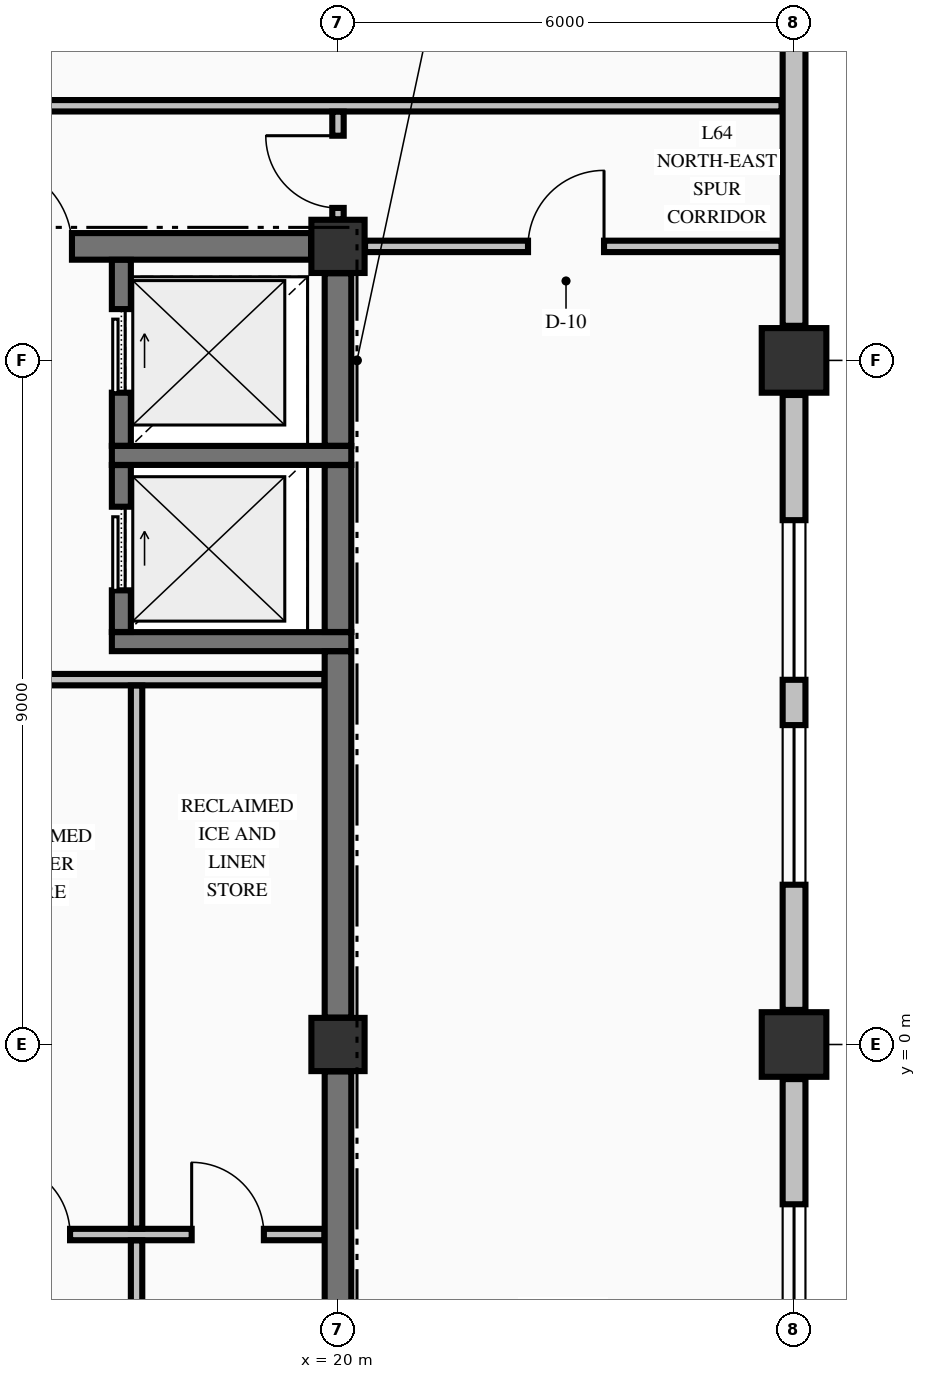
"""IFC4 building model, lengths in metres.
Left out: names, types, materials, properties, quantities, classifications, styles, units other than length and angle.
Written with IfcOpenShell. Run it as: python <this file> out.ifc"""

import sys

from ifc_helpers import new_model, si_unit, direction, frame, frame_2d, origin, origin_2d, place, context, subcontext, project, spatial, rectangle, extrude, element, fill, save


model = new_model("IFC4")
c1 = context("Model", 3, precision=1e-05, world=origin(), true_north=direction((0.0, 1.0)))
c2 = subcontext(c1, "Body", "Model", "MODEL_VIEW")
j1 = project(units=[si_unit("LENGTHUNIT", "METRE"), si_unit("PLANEANGLEUNIT", "RADIAN")], contexts=[c1])
p1 = place(None, origin())
s1 = spatial("IfcSite", under=j1, at=p1, CompositionType="ELEMENT")
p2 = place(p1, origin())
s2 = spatial("IfcBuilding", under=s1, at=p2, CompositionType="ELEMENT")
p3 = place(p2, frame((0.0, 0.0, 242.97)))
s3 = spatial("IfcBuildingStorey", under=s2, at=p3, CompositionType="ELEMENT", Elevation=242.97)
for number, where, z_axis, x_axis in (
    (1, (26.0, 0.0, -0.25), (0.0, 0.0, 1.0), (1.0, 0.0, 0.0)),
    (2, (26.0, 9.0, -0.25), (0.0, 0.0, 1.0), (1.0, 0.0, 0.0)),
):
    element("IfcColumn", number, at=place(p3, frame(where, z_axis=z_axis, x_axis=x_axis)), inside=s3, PredefinedType="COLUMN", context=c2, shape_type="SweptSolid", body=[
        extrude(rectangle(XDim=0.85, YDim=0.85, at=origin_2d()), origin(), (0.0, 0.0, 1.0), 3.23),
    ])
for number, where, z_axis, x_axis in (
    (3, (20.0, 10.5, -0.25), (0.0, 0.0, 1.0), (1.0, 0.0, 0.0)),
    (4, (20.0, 0.0, -0.25), (0.0, 0.0, 1.0), (1.0, 0.0, 0.0)),
):
    element("IfcColumn", number, at=place(p3, frame(where, z_axis=z_axis, x_axis=x_axis)), inside=s3, PredefinedType="COLUMN", context=c2, shape_type="SweptSolid", body=[
        extrude(rectangle(XDim=0.7, YDim=0.7, at=origin_2d()), origin(), (0.0, 0.0, 1.0), 3.23),
    ])
p4 = place(p3, frame((26.0, -8.545, 0.0), z_axis=(0.0, 0.0, 1.0), x_axis=(0.0, 1.0, 0.0)))
e5 = element("IfcWall", 5, at=p4, inside=s3, PredefinedType="STANDARD", context=c2, shape_type="SweptSolid", body=[
    extrude(rectangle(XDim=8.09, YDim=0.3, at=frame_2d((4.045, 0.0))), origin(), (0.0, 0.0, 1.0), 2.372),
])
p5 = place(p4, frame((1.647, 0.0, 0.7)))
e6 = element("IfcOpeningElement", 6, at=p5, cuts=e5, PredefinedType="OPENING", context=c2, shape_type="SweptSolid", body=[
    extrude(rectangle(XDim=2.1, YDim=1.5, at=frame_2d((1.05, 0.75))), frame((0.0, 0.16, 0.0), z_axis=(0.0, -1.0, 0.0), x_axis=(1.0, 0.0, 0.0)), (0.0, 0.0, 1.0), 0.32),
])
p6 = place(p4, frame((4.343, 0.0, 0.7)))
e7 = element("IfcOpeningElement", 7, at=p6, cuts=e5, PredefinedType="OPENING", context=c2, shape_type="SweptSolid", body=[
    extrude(rectangle(XDim=2.1, YDim=1.5, at=frame_2d((1.05, 0.75))), frame((0.0, 0.16, 0.0), z_axis=(0.0, -1.0, 0.0), x_axis=(1.0, 0.0, 0.0)), (0.0, 0.0, 1.0), 0.32),
])
p7 = place(p3, frame((26.0, 0.455, 0.0), z_axis=(0.0, 0.0, 1.0), x_axis=(0.0, 1.0, 0.0)))
e8 = element("IfcWall", 8, at=p7, inside=s3, PredefinedType="STANDARD", context=c2, shape_type="SweptSolid", body=[
    extrude(rectangle(XDim=8.09, YDim=0.3, at=frame_2d((4.045, 0.0))), origin(), (0.0, 0.0, 1.0), 2.372),
])
p8 = place(p7, frame((1.647, 0.0, 0.7)))
e9 = element("IfcOpeningElement", 9, at=p8, cuts=e8, PredefinedType="OPENING", context=c2, shape_type="SweptSolid", body=[
    extrude(rectangle(XDim=2.1, YDim=1.5, at=frame_2d((1.05, 0.75))), frame((0.0, 0.16, 0.0), z_axis=(0.0, -1.0, 0.0), x_axis=(1.0, 0.0, 0.0)), (0.0, 0.0, 1.0), 0.32),
])
p9 = place(p7, frame((4.343, 0.0, 0.7)))
e10 = element("IfcOpeningElement", 10, at=p9, cuts=e8, PredefinedType="OPENING", context=c2, shape_type="SweptSolid", body=[
    extrude(rectangle(XDim=2.1, YDim=1.5, at=frame_2d((1.05, 0.75))), frame((0.0, 0.16, 0.0), z_axis=(0.0, -1.0, 0.0), x_axis=(1.0, 0.0, 0.0)), (0.0, 0.0, 1.0), 0.32),
])
p10 = place(p3, frame((26.0, 9.455, 0.0), z_axis=(0.0, 0.0, 1.0), x_axis=(0.0, 1.0, 0.0)))
e11 = element("IfcWall", 11, at=p10, inside=s3, PredefinedType="STANDARD", context=c2, shape_type="SweptSolid", body=[
    extrude(rectangle(XDim=8.09, YDim=0.3, at=frame_2d((4.045, 0.0))), origin(), (0.0, 0.0, 1.0), 2.372),
])
for number, where, z_axis, x_axis in (
    (12, (17.025, 5.3, 0.0), (0.0, 0.0, 1.0), (1.0, 0.0, 0.0)),
    (13, (17.025, 7.75, 0.0), (0.0, 0.0, 1.0), (1.0, 0.0, 0.0)),
):
    element("IfcWall", number, at=place(p3, frame(where, z_axis=z_axis, x_axis=x_axis)), inside=s3, PredefinedType="SOLIDWALL", context=c2, shape_type="SweptSolid", body=[
        extrude(rectangle(XDim=3.15, YDim=0.25, at=frame_2d((1.575, 0.0))), origin(), (0.0, 0.0, 1.0), 2.98),
    ])
p11 = place(p3, frame((14.7, 10.5, 0.0), z_axis=(0.0, 0.0, 1.0), x_axis=(1.0, 0.0, 0.0)))
e14 = element("IfcWall", 14, at=p11, inside=s3, PredefinedType="SHEAR", context=c2, shape_type="SweptSolid", body=[
    extrude(rectangle(XDim=4.946, YDim=0.35, at=frame_2d((2.473, 0.0))), origin(), (0.0, 0.0, 1.0), 2.98),
])
p12 = place(p11, frame((0.7, 0.0, 0.0)))
e15 = element("IfcOpeningElement", 15, at=p12, cuts=e14, PredefinedType="OPENING", context=c2, shape_type="SweptSolid", body=[
    extrude(rectangle(XDim=1.1, YDim=2.15, at=frame_2d((0.55, 1.075))), frame((0.0, 0.185, 0.0), z_axis=(0.0, -1.0, 0.0), x_axis=(1.0, 0.0, 0.0)), (0.0, 0.0, 1.0), 0.37),
])
p13 = place(p3, frame((14.878, -2.5, 0.0), z_axis=(0.0, 0.0, 1.0), x_axis=(1.0, 0.0, 0.0)))
e16 = element("IfcWall", 16, at=p13, inside=s3, PredefinedType="PARTITIONING", context=c2, shape_type="SweptSolid", body=[
    extrude(rectangle(XDim=4.944, YDim=0.15, at=frame_2d((2.472, 0.0))), origin(), (0.0, 0.0, 1.0), 2.98),
])
p14 = place(p13, frame((0.647, 0.0, 0.0)))
e17 = element("IfcOpeningElement", 17, at=p14, cuts=e16, PredefinedType="OPENING", context=c2, shape_type="SweptSolid", body=[
    extrude(rectangle(XDim=0.95, YDim=2.15, at=frame_2d((0.475, 1.075))), frame((0.0, 0.085, 0.0), z_axis=(0.0, -1.0, 0.0), x_axis=(1.0, 0.0, 0.0)), (0.0, 0.0, 1.0), 0.17),
])
p15 = place(p13, frame((3.197, 0.0, 0.0)))
e18 = element("IfcOpeningElement", 18, at=p15, cuts=e16, PredefinedType="OPENING", context=c2, shape_type="SweptSolid", body=[
    extrude(rectangle(XDim=0.95, YDim=2.15, at=frame_2d((0.475, 1.075))), frame((0.0, 0.085, 0.0), z_axis=(0.0, -1.0, 0.0), x_axis=(1.0, 0.0, 0.0)), (0.0, 0.0, 1.0), 0.17),
])
p16 = place(p3, frame((14.878, 4.8, 0.0), z_axis=(0.0, 0.0, 1.0), x_axis=(1.0, 0.0, 0.0)))
e19 = element("IfcWall", 19, at=p16, inside=s3, PredefinedType="PARTITIONING", context=c2, shape_type="SweptSolid", body=[
    extrude(rectangle(XDim=4.944, YDim=0.15, at=frame_2d((2.472, 0.0))), origin(), (0.0, 0.0, 1.0), 2.98),
])
p17 = place(p3, frame((20.356, 10.5, 0.0), z_axis=(0.0, 0.0, 1.0), x_axis=(1.0, 0.0, 0.0)))
e20 = element("IfcWall", 20, at=p17, inside=s3, PredefinedType="PARTITIONING", context=c2, shape_type="SweptSolid", body=[
    extrude(rectangle(XDim=5.479, YDim=0.15, at=frame_2d((2.74, 0.0))), origin(), (0.0, 0.0, 1.0), 2.98),
])
p18 = place(p17, frame((2.144, 0.0, 0.0)))
e21 = element("IfcOpeningElement", 21, at=p18, cuts=e20, PredefinedType="OPENING", context=c2, shape_type="SweptSolid", body=[
    extrude(rectangle(XDim=1.0, YDim=2.15, at=frame_2d((0.5, 1.075))), frame((0.0, 0.085, 0.0), z_axis=(0.0, -1.0, 0.0), x_axis=(1.0, 0.0, 0.0)), (0.0, 0.0, 1.0), 0.17),
])
p19 = place(p3, frame((-20.075, 12.35, 0.0), z_axis=(0.0, 0.0, 1.0), x_axis=(1.0, 0.0, 0.0)))
e22 = element("IfcWall", 22, at=p19, inside=s3, PredefinedType="PARTITIONING", context=c2, shape_type="SweptSolid", body=[
    extrude(rectangle(XDim=45.91, YDim=0.15, at=frame_2d((22.955, 0.0))), origin(), (0.0, 0.0, 1.0), 2.98),
])
p20 = place(p19, frame((5.7, 0.0, 0.0)))
e23 = element("IfcOpeningElement", 23, at=p20, cuts=e22, PredefinedType="OPENING", context=c2, shape_type="SweptSolid", body=[
    extrude(rectangle(XDim=1.05, YDim=2.15, at=frame_2d((0.525, 1.075))), frame((0.0, 0.085, 0.0), z_axis=(0.0, -1.0, 0.0), x_axis=(1.0, 0.0, 0.0)), (0.0, 0.0, 1.0), 0.17),
])
p21 = place(p19, frame((17.3, 0.0, 0.0)))
e24 = element("IfcOpeningElement", 24, at=p21, cuts=e22, PredefinedType="OPENING", context=c2, shape_type="SweptSolid", body=[
    extrude(rectangle(XDim=1.05, YDim=2.15, at=frame_2d((0.525, 1.075))), frame((0.0, 0.085, 0.0), z_axis=(0.0, -1.0, 0.0), x_axis=(1.0, 0.0, 0.0)), (0.0, 0.0, 1.0), 0.17),
])
p22 = place(p19, frame((32.5, 0.0, 0.0)))
e25 = element("IfcOpeningElement", 25, at=p22, cuts=e22, PredefinedType="OPENING", context=c2, shape_type="SweptSolid", body=[
    extrude(rectangle(XDim=1.05, YDim=2.15, at=frame_2d((0.525, 1.075))), frame((0.0, 0.085, 0.0), z_axis=(0.0, -1.0, 0.0), x_axis=(1.0, 0.0, 0.0)), (0.0, 0.0, 1.0), 0.17),
])
p23 = place(p3, frame((17.15, 5.427, 0.0), z_axis=(0.0, 0.0, 1.0), x_axis=(0.0, 1.0, 0.0)))
e26 = element("IfcWall", 26, at=p23, inside=s3, PredefinedType="SOLIDWALL", context=c2, shape_type="SweptSolid", body=[
    extrude(rectangle(XDim=2.196, YDim=0.25, at=frame_2d((1.098, 0.0))), origin(), (0.0, 0.0, 1.0), 2.98),
])
p24 = place(p23, frame((0.548, 0.0, 0.0)))
e27 = element("IfcOpeningElement", 27, at=p24, cuts=e26, PredefinedType="OPENING", context=c2, shape_type="SweptSolid", body=[
    extrude(rectangle(XDim=1.1, YDim=2.2, at=frame_2d((0.55, 1.1))), frame((0.0, 0.135, 0.0), z_axis=(0.0, -1.0, 0.0), x_axis=(1.0, 0.0, 0.0)), (0.0, 0.0, 1.0), 0.27),
])
p25 = place(p3, frame((17.15, 7.877, 0.0), z_axis=(0.0, 0.0, 1.0), x_axis=(0.0, 1.0, 0.0)))
e28 = element("IfcWall", 28, at=p25, inside=s3, PredefinedType="SOLIDWALL", context=c2, shape_type="SweptSolid", body=[
    extrude(rectangle(XDim=2.446, YDim=0.25, at=frame_2d((1.223, 0.0))), origin(), (0.0, 0.0, 1.0), 2.98),
])
p26 = place(p25, frame((0.698, 0.0, 0.0)))
e29 = element("IfcOpeningElement", 29, at=p26, cuts=e28, PredefinedType="OPENING", context=c2, shape_type="SweptSolid", body=[
    extrude(rectangle(XDim=1.1, YDim=2.2, at=frame_2d((0.55, 1.1))), frame((0.0, 0.135, 0.0), z_axis=(0.0, -1.0, 0.0), x_axis=(1.0, 0.0, 0.0)), (0.0, 0.0, 1.0), 0.27),
])
p27 = place(p3, frame((20.0, -9.596, 0.0), z_axis=(0.0, 0.0, 1.0), x_axis=(0.0, 1.0, 0.0)))
e30 = element("IfcWall", 30, at=p27, inside=s3, PredefinedType="SHEAR", context=c2, shape_type="SweptSolid", body=[
    extrude(rectangle(XDim=9.242, YDim=0.35, at=frame_2d((4.621, 0.0))), origin(), (0.0, 0.0, 1.0), 2.98),
])
p28 = place(p3, frame((20.0, 0.354, 0.0), z_axis=(0.0, 0.0, 1.0), x_axis=(0.0, 1.0, 0.0)))
e31 = element("IfcWall", 31, at=p28, inside=s3, PredefinedType="SHEAR", context=c2, shape_type="SweptSolid", body=[
    extrude(rectangle(XDim=4.819, YDim=0.35, at=frame_2d((2.41, 0.0))), origin(), (0.0, 0.0, 1.0), 2.98),
])
p29 = place(p3, frame((20.0, 5.427, 0.0), z_axis=(0.0, 0.0, 1.0), x_axis=(0.0, 1.0, 0.0)))
e32 = element("IfcWall", 32, at=p29, inside=s3, PredefinedType="SHEAR", context=c2, shape_type="SweptSolid", body=[
    extrude(rectangle(XDim=2.196, YDim=0.35, at=frame_2d((1.098, 0.0))), origin(), (0.0, 0.0, 1.0), 2.98),
])
p30 = place(p3, frame((20.0, 7.877, 0.0), z_axis=(0.0, 0.0, 1.0), x_axis=(0.0, 1.0, 0.0)))
e33 = element("IfcWall", 33, at=p30, inside=s3, PredefinedType="SHEAR", context=c2, shape_type="SweptSolid", body=[
    extrude(rectangle(XDim=2.269, YDim=0.35, at=frame_2d((1.135, 0.0))), origin(), (0.0, 0.0, 1.0), 2.98),
])
p31 = place(p3, frame((17.35, -9.772, 0.0), z_axis=(0.0, 0.0, 1.0), x_axis=(0.0, 1.0, 0.0)))
e34 = element("IfcWall", 34, at=p31, inside=s3, PredefinedType="PARTITIONING", context=c2, shape_type="SweptSolid", body=[
    extrude(rectangle(XDim=7.194, YDim=0.15, at=frame_2d((3.597, 0.0))), origin(), (0.0, 0.0, 1.0), 2.98),
])
p32 = place(p3, frame((17.35, -2.422, 0.0), z_axis=(0.0, 0.0, 1.0), x_axis=(0.0, 1.0, 0.0)))
e35 = element("IfcWall", 35, at=p32, inside=s3, PredefinedType="PARTITIONING", context=c2, shape_type="SweptSolid", body=[
    extrude(rectangle(XDim=7.144, YDim=0.15, at=frame_2d((3.572, 0.0))), origin(), (0.0, 0.0, 1.0), 2.98),
])
p33 = place(p3, frame((20.0, 10.856, 0.0), z_axis=(0.0, 0.0, 1.0), x_axis=(0.0, 1.0, 0.0)))
e36 = element("IfcWall", 36, at=p33, inside=s3, PredefinedType="PARTITIONING", context=c2, shape_type="SweptSolid", body=[
    extrude(rectangle(XDim=1.416, YDim=0.15, at=frame_2d((0.708, 0.0))), origin(), (0.0, 0.0, 1.0), 2.98),
])
p34 = place(p33, frame((0.15, 0.0, 0.0)))
e37 = element("IfcOpeningElement", 37, at=p34, cuts=e36, PredefinedType="OPENING", context=c2, shape_type="SweptSolid", body=[
    extrude(rectangle(XDim=0.95, YDim=2.15, at=frame_2d((0.475, 1.075))), frame((0.0, 0.085, 0.0), z_axis=(0.0, -1.0, 0.0), x_axis=(1.0, 0.0, 0.0)), (0.0, 0.0, 1.0), 0.17),
])
p35 = place(p6, origin())
e38 = element("IfcWindow", 38, at=p35, inside=s3, PartitioningType="SINGLE_PANEL", PredefinedType="WINDOW", context=c2, shape_type="SweptSolid", body=[
    extrude(rectangle(XDim=2.1, YDim=1.5, at=frame_2d((1.05, 0.75))), frame((0.0, 0.03, 0.0), z_axis=(0.0, -1.0, 0.0), x_axis=(1.0, 0.0, 0.0)), (0.0, 0.0, 1.0), 0.06),
])
fill(e7, e38)
p36 = place(p8, origin())
e39 = element("IfcWindow", 39, at=p36, inside=s3, PartitioningType="SINGLE_PANEL", PredefinedType="WINDOW", context=c2, shape_type="SweptSolid", body=[
    extrude(rectangle(XDim=2.1, YDim=1.5, at=frame_2d((1.05, 0.75))), frame((0.0, 0.03, 0.0), z_axis=(0.0, -1.0, 0.0), x_axis=(1.0, 0.0, 0.0)), (0.0, 0.0, 1.0), 0.06),
])
fill(e9, e39)
p37 = place(p9, origin())
e40 = element("IfcWindow", 40, at=p37, inside=s3, PartitioningType="SINGLE_PANEL", PredefinedType="WINDOW", context=c2, shape_type="SweptSolid", body=[
    extrude(rectangle(XDim=2.1, YDim=1.5, at=frame_2d((1.05, 0.75))), frame((0.0, 0.03, 0.0), z_axis=(0.0, -1.0, 0.0), x_axis=(1.0, 0.0, 0.0)), (0.0, 0.0, 1.0), 0.06),
])
fill(e10, e40)
p38 = place(p24, origin())
e41 = element("IfcDoor", 41, at=p38, inside=s3, OperationType="SLIDING_TO_RIGHT", PredefinedType="DOOR", context=c2, shape_type="SweptSolid", body=[
    extrude(rectangle(XDim=1.1, YDim=2.2, at=frame_2d((0.55, 1.1))), frame((0.0, 0.025, 0.0), z_axis=(0.0, -1.0, 0.0), x_axis=(1.0, 0.0, 0.0)), (0.0, 0.0, 1.0), 0.05),
])
fill(e27, e41)
p39 = place(p26, origin())
e42 = element("IfcDoor", 42, at=p39, inside=s3, OperationType="SLIDING_TO_RIGHT", PredefinedType="DOOR", context=c2, shape_type="SweptSolid", body=[
    extrude(rectangle(XDim=1.1, YDim=2.2, at=frame_2d((0.55, 1.1))), frame((0.0, 0.025, 0.0), z_axis=(0.0, -1.0, 0.0), x_axis=(1.0, 0.0, 0.0)), (0.0, 0.0, 1.0), 0.05),
])
fill(e29, e42)
p40 = place(p12, origin())
e43 = element("IfcDoor", 43, at=p40, inside=s3, OperationType="SINGLE_SWING_LEFT", PredefinedType="DOOR", context=c2, shape_type="SweptSolid", body=[
    extrude(rectangle(XDim=1.1, YDim=2.15, at=frame_2d((0.55, 1.075))), frame((0.0, 0.025, 0.0), z_axis=(0.0, -1.0, 0.0), x_axis=(1.0, 0.0, 0.0)), (0.0, 0.0, 1.0), 0.05),
])
fill(e15, e43)
p41 = place(p14, origin())
e44 = element("IfcDoor", 44, at=p41, inside=s3, OperationType="SINGLE_SWING_LEFT", PredefinedType="DOOR", context=c2, shape_type="SweptSolid", body=[
    extrude(rectangle(XDim=0.95, YDim=2.15, at=frame_2d((0.475, 1.075))), frame((0.0, 0.025, 0.0), z_axis=(0.0, -1.0, 0.0), x_axis=(1.0, 0.0, 0.0)), (0.0, 0.0, 1.0), 0.05),
])
fill(e17, e44)
p42 = place(p15, origin())
e45 = element("IfcDoor", 45, at=p42, inside=s3, OperationType="SINGLE_SWING_LEFT", PredefinedType="DOOR", context=c2, shape_type="SweptSolid", body=[
    extrude(rectangle(XDim=0.95, YDim=2.15, at=frame_2d((0.475, 1.075))), frame((0.0, 0.025, 0.0), z_axis=(0.0, -1.0, 0.0), x_axis=(1.0, 0.0, 0.0)), (0.0, 0.0, 1.0), 0.05),
])
fill(e18, e45)
p43 = place(p34, origin())
e46 = element("IfcDoor", 46, at=p43, inside=s3, OperationType="SINGLE_SWING_RIGHT", PredefinedType="DOOR", context=c2, shape_type="SweptSolid", body=[
    extrude(rectangle(XDim=0.95, YDim=2.15, at=frame_2d((0.475, 1.075))), frame((0.0, 0.025, 0.0), z_axis=(0.0, -1.0, 0.0), x_axis=(1.0, 0.0, 0.0)), (0.0, 0.0, 1.0), 0.05),
])
fill(e37, e46)
p44 = place(p18, origin())
e47 = element("IfcDoor", 47, at=p44, inside=s3, OperationType="SINGLE_SWING_RIGHT", PredefinedType="DOOR", context=c2, shape_type="SweptSolid", body=[
    extrude(rectangle(XDim=1.0, YDim=2.15, at=frame_2d((0.5, 1.075))), frame((0.0, 0.025, 0.0), z_axis=(0.0, -1.0, 0.0), x_axis=(1.0, 0.0, 0.0)), (0.0, 0.0, 1.0), 0.05),
])
fill(e21, e47)
save(model, sys.argv[1])
